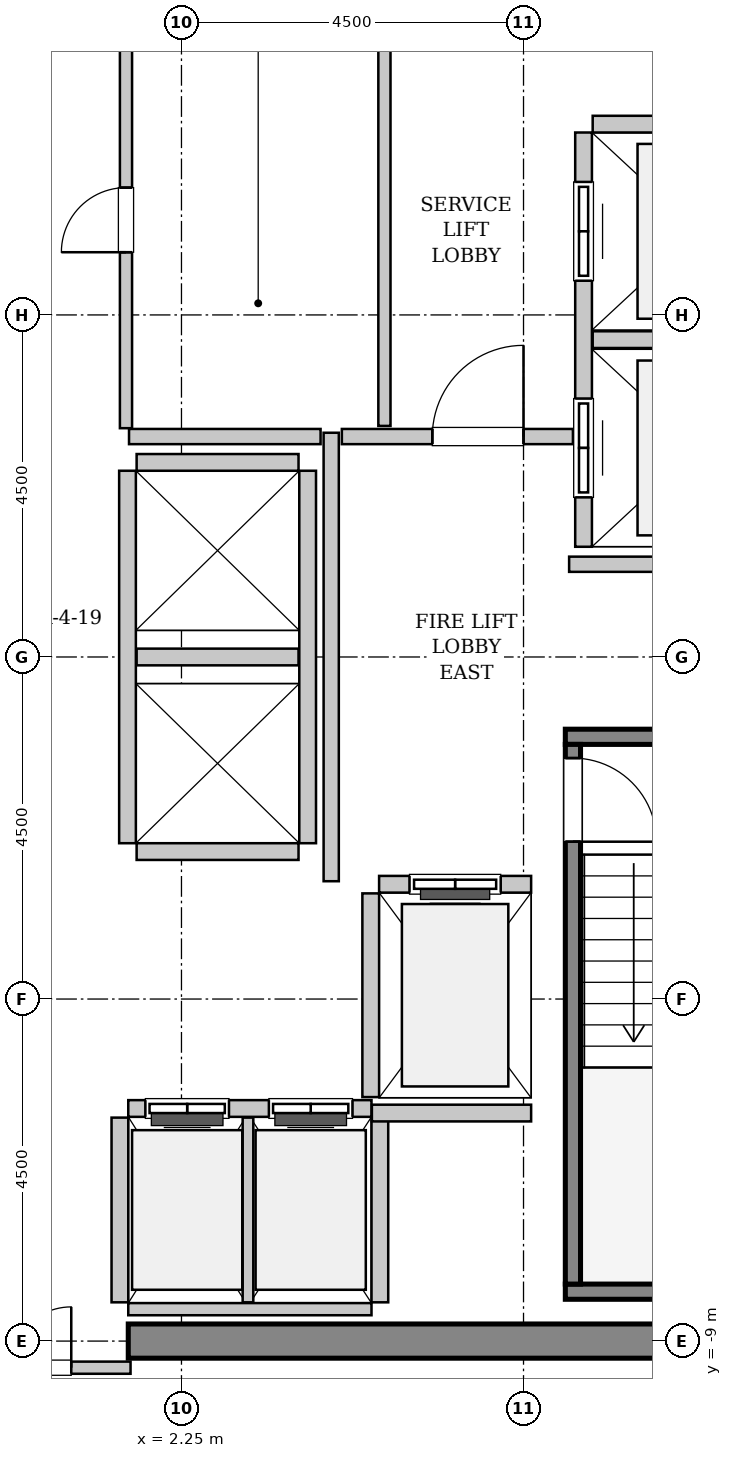
"""IFC4 building model, lengths in metres.
Left out: names, types, materials, properties, quantities, classifications, styles, units other than length and angle.
Written with IfcOpenShell. Run it as: python <this file> out.ifc"""

import sys

from ifc_helpers import new_model, si_unit, direction, frame, frame_2d, origin, place, context, subcontext, project, spatial, rectangle, extrude, source, transform, mapped, element, fill, save


model = new_model("IFC4")
c1 = context("Model", 3, precision=1e-05, world=origin(), true_north=direction((0.0, 1.0)))
c2 = subcontext(c1, "Body", "Model", "MODEL_VIEW")
j1 = project(units=[si_unit("LENGTHUNIT", "METRE"), si_unit("PLANEANGLEUNIT", "RADIAN")], contexts=[c1])
p1 = place(None, origin())
s1 = spatial("IfcSite", under=j1, at=p1, CompositionType="ELEMENT")
p2 = place(p1, origin())
s2 = spatial("IfcBuilding", under=s1, at=p2, CompositionType="ELEMENT")
p3 = place(p2, frame((0.0, 0.0, 214.2)))
s3 = spatial("IfcBuildingStorey", under=s2, at=p3, CompositionType="ELEMENT", Elevation=214.2)
m1 = source(origin(), c2, "Body", "SweptSolid", [
    extrude(rectangle(XDim=9.925, YDim=0.45, at=frame_2d((4.962, 0.0))), origin(), (0.0, 0.0, 1.0), 3.8),
])
p4 = place(p3, frame((1.55, -9.0, 0.0), z_axis=(0.0, 0.0, 1.0), x_axis=(1.0, 0.0, 0.0)))
e1 = element("IfcWall", 1, at=p4, inside=s3, PredefinedType="SHEAR", context=c2, shape_type="MappedRepresentation", body=[
    mapped(m1, transform((0.0, 0.0, 0.0), x_axis=(1.0, 0.0, 0.0), y_axis=(0.0, 1.0, 0.0), z_axis=(0.0, 0.0, 1.0), scale=1.0)),
])
m2 = source(origin(), c2, "Body", "SweptSolid", [
    extrude(rectangle(XDim=3.4, YDim=0.2, at=frame_2d((1.7, 0.0))), origin(), (0.0, 0.0, 1.0), 3.8),
])
p5 = place(p3, frame((7.3, -1.05, 0.0), z_axis=(0.0, 0.0, 1.0), x_axis=(1.0, 0.0, 0.0)))
e2 = element("IfcWall", 2, at=p5, inside=s3, PredefinedType="SOLIDWALL", context=c2, shape_type="MappedRepresentation", body=[
    mapped(m2, transform((0.0, 0.0, 0.0), x_axis=(1.0, 0.0, 0.0), y_axis=(0.0, 1.0, 0.0), z_axis=(0.0, 0.0, 1.0), scale=1.0)),
])
m3 = source(origin(), c2, "Body", "SweptSolid", [
    extrude(rectangle(XDim=3.73, YDim=0.2, at=frame_2d((1.865, 0.0))), origin(), (0.0, 0.0, 1.0), 3.8),
])
p6 = place(p3, frame((7.3, -8.35, 0.0), z_axis=(0.0, 0.0, 1.0), x_axis=(1.0, 0.0, 0.0)))
e3 = element("IfcWall", 3, at=p6, inside=s3, PredefinedType="SOLIDWALL", context=c2, shape_type="MappedRepresentation", body=[
    mapped(m3, transform((0.0, 0.0, 0.0), x_axis=(1.0, 0.0, 0.0), y_axis=(0.0, 1.0, 0.0), z_axis=(0.0, 0.0, 1.0), scale=1.0)),
])
m4 = source(origin(), c2, "Body", "SweptSolid", [
    extrude(rectangle(XDim=7.1, YDim=0.2, at=frame_2d((3.55, 0.0))), origin(), (0.0, 0.0, 1.0), 3.8),
])
p7 = place(p3, frame((7.4, -1.15, 0.0), z_axis=(0.0, 0.0, 1.0), x_axis=(0.0, -1.0, 0.0)))
e4 = element("IfcWall", 4, at=p7, inside=s3, PredefinedType="SOLIDWALL", context=c2, shape_type="MappedRepresentation", body=[
    mapped(m4, transform((0.0, 0.0, 0.0), x_axis=(1.0, 0.0, 0.0), y_axis=(0.0, 1.0, 0.0), z_axis=(0.0, 0.0, 1.0), scale=1.0)),
])
p8 = place(p7, frame((0.18, 0.0, 0.0)))
e5 = element("IfcOpeningElement", 5, at=p8, cuts=e4, PredefinedType="OPENING", context=c2, shape_type="SweptSolid", body=[
    extrude(rectangle(XDim=1.1, YDim=2.15, at=frame_2d((0.55, 1.075))), frame((0.0, 0.11, 0.0), z_axis=(0.0, -1.0, 0.0), x_axis=(1.0, 0.0, 0.0)), (0.0, 0.0, 1.0), 0.22),
])
m5 = source(origin(), c2, "Body", "SweptSolid", [
    extrude(rectangle(XDim=2.0, YDim=0.22, at=frame_2d((1.0, 0.0))), origin(), (0.0, 0.0, 1.0), 3.535),
])
p9 = place(p3, frame((6.85, -2.99, 0.0), z_axis=(0.0, 0.0, 1.0), x_axis=(-1.0, 0.0, 0.0)))
e6 = element("IfcWall", 6, at=p9, inside=s3, PredefinedType="SOLIDWALL", context=c2, shape_type="MappedRepresentation", body=[
    mapped(m5, transform((0.0, 0.0, 0.0), x_axis=(1.0, 0.0, 0.0), y_axis=(0.0, 1.0, 0.0), z_axis=(0.0, 0.0, 1.0), scale=1.0)),
])
p10 = place(p9, frame((0.4, 0.0, 0.0)))
e7 = element("IfcOpeningElement", 7, at=p10, cuts=e6, PredefinedType="OPENING", context=c2, shape_type="SweptSolid", body=[
    extrude(rectangle(XDim=1.2, YDim=2.2, at=frame_2d((0.6, 1.1))), frame((0.0, 0.12, 0.0), z_axis=(0.0, -1.0, 0.0), x_axis=(1.0, 0.0, 0.0)), (0.0, 0.0, 1.0), 0.24),
])
m6 = source(origin(), c2, "Body", "SweptSolid", [
    extrude(rectangle(XDim=2.68, YDim=0.22, at=frame_2d((1.34, 0.0))), origin(), (0.0, 0.0, 1.0), 3.535),
])
p11 = place(p3, frame((4.74, -3.11, 0.0), z_axis=(0.0, 0.0, 1.0), x_axis=(0.0, -1.0, 0.0)))
e8 = element("IfcWall", 8, at=p11, inside=s3, PredefinedType="SOLIDWALL", context=c2, shape_type="MappedRepresentation", body=[
    mapped(m6, transform((0.0, 0.0, 0.0), x_axis=(1.0, 0.0, 0.0), y_axis=(0.0, 1.0, 0.0), z_axis=(0.0, 0.0, 1.0), scale=1.0)),
])
m7 = source(origin(), c2, "Body", "SweptSolid", [
    extrude(rectangle(XDim=5.45, YDim=0.22, at=frame_2d((2.725, 0.0))), origin(), (0.0, 0.0, 1.0), 3.535),
])
p12 = place(p3, frame((7.54, 6.9, 0.0), z_axis=(0.0, 0.0, 1.0), x_axis=(0.0, -1.0, 0.0)))
e9 = element("IfcWall", 9, at=p12, inside=s3, PredefinedType="SOLIDWALL", context=c2, shape_type="MappedRepresentation", body=[
    mapped(m7, transform((0.0, 0.0, 0.0), x_axis=(1.0, 0.0, 0.0), y_axis=(0.0, 1.0, 0.0), z_axis=(0.0, 0.0, 1.0), scale=1.0)),
])
p13 = place(p12, frame((3.5, 0.0, 0.0)))
e10 = element("IfcOpeningElement", 10, at=p13, cuts=e9, PredefinedType="OPENING", context=c2, shape_type="SweptSolid", body=[
    extrude(rectangle(XDim=1.3, YDim=2.3, at=frame_2d((0.65, 1.15))), frame((0.0, 0.12, 0.0), z_axis=(0.0, -1.0, 0.0), x_axis=(1.0, 0.0, 0.0)), (0.0, 0.0, 1.0), 0.24),
])
p14 = place(p12, frame((0.65, 0.0, 0.0)))
e11 = element("IfcOpeningElement", 11, at=p14, cuts=e9, PredefinedType="OPENING", context=c2, shape_type="SweptSolid", body=[
    extrude(rectangle(XDim=1.3, YDim=2.3, at=frame_2d((0.65, 1.15))), frame((0.0, 0.12, 0.0), z_axis=(0.0, -1.0, 0.0), x_axis=(1.0, 0.0, 0.0)), (0.0, 0.0, 1.0), 0.24),
])
m8 = source(origin(), c2, "Body", "SweptSolid", [
    extrude(rectangle(XDim=2.78, YDim=0.22, at=frame_2d((1.39, 0.0))), origin(), (0.0, 0.0, 1.0), 3.535),
])
for number, where, z_axis, x_axis in (
    (12, (7.66, 4.175, 0.0), (0.0, 0.0, 1.0), (1.0, 0.0, 0.0)),
    (13, (10.44, 7.01, 0.0), (0.0, 0.0, 1.0), (-1.0, 0.0, 0.0)),
):
    element("IfcWall", number, at=place(p3, frame(where, z_axis=z_axis, x_axis=x_axis)), inside=s3, PredefinedType="SOLIDWALL", context=c2, shape_type="MappedRepresentation", body=[
        mapped(m8, transform((0.0, 0.0, 0.0), x_axis=(1.0, 0.0, 0.0), y_axis=(0.0, 1.0, 0.0), z_axis=(0.0, 0.0, 1.0), scale=1.0)),
    ])
m9 = source(origin(), c2, "Body", "SweptSolid", [
    extrude(rectangle(XDim=3.2, YDim=0.22, at=frame_2d((1.6, 0.0))), origin(), (0.0, 0.0, 1.0), 3.535),
])
p15 = place(p3, frame((4.75, -5.94, 0.0), z_axis=(0.0, 0.0, 1.0), x_axis=(-1.0, 0.0, 0.0)))
e14 = element("IfcWall", 14, at=p15, inside=s3, PredefinedType="SOLIDWALL", context=c2, shape_type="MappedRepresentation", body=[
    mapped(m9, transform((0.0, 0.0, 0.0), x_axis=(1.0, 0.0, 0.0), y_axis=(0.0, 1.0, 0.0), z_axis=(0.0, 0.0, 1.0), scale=1.0)),
])
p16 = place(p15, frame((1.875, 0.0, 0.0)))
e15 = element("IfcOpeningElement", 15, at=p16, cuts=e14, PredefinedType="OPENING", context=c2, shape_type="SweptSolid", body=[
    extrude(rectangle(XDim=1.1, YDim=2.2, at=frame_2d((0.55, 1.1))), frame((0.0, 0.12, 0.0), z_axis=(0.0, -1.0, 0.0), x_axis=(1.0, 0.0, 0.0)), (0.0, 0.0, 1.0), 0.24),
])
p17 = place(p15, frame((0.25, 0.0, 0.0)))
e16 = element("IfcOpeningElement", 16, at=p17, cuts=e14, PredefinedType="OPENING", context=c2, shape_type="SweptSolid", body=[
    extrude(rectangle(XDim=1.1, YDim=2.2, at=frame_2d((0.55, 1.1))), frame((0.0, 0.12, 0.0), z_axis=(0.0, -1.0, 0.0), x_axis=(1.0, 0.0, 0.0)), (0.0, 0.0, 1.0), 0.24),
])
m10 = source(origin(), c2, "Body", "SweptSolid", [
    extrude(rectangle(XDim=3.2, YDim=0.16, at=frame_2d((1.6, 0.0))), origin(), (0.0, 0.0, 1.0), 2.625),
])
p18 = place(p3, frame((1.55, -8.58, 0.0), z_axis=(0.0, 0.0, 1.0), x_axis=(1.0, 0.0, 0.0)))
e17 = element("IfcWall", 17, at=p18, inside=s3, PredefinedType="PARTITIONING", context=c2, shape_type="MappedRepresentation", body=[
    mapped(m10, transform((0.0, 0.0, 0.0), x_axis=(1.0, 0.0, 0.0), y_axis=(0.0, 1.0, 0.0), z_axis=(0.0, 0.0, 1.0), scale=1.0)),
])
m11 = source(origin(), c2, "Body", "SweptSolid", [
    extrude(rectangle(XDim=2.43, YDim=0.22, at=frame_2d((1.215, 0.0))), origin(), (0.0, 0.0, 1.0), 3.535),
])
p19 = place(p3, frame((1.44, -6.06, 0.0), z_axis=(0.0, 0.0, 1.0), x_axis=(0.0, -1.0, 0.0)))
e18 = element("IfcWall", 18, at=p19, inside=s3, PredefinedType="SOLIDWALL", context=c2, shape_type="MappedRepresentation", body=[
    mapped(m11, transform((0.0, 0.0, 0.0), x_axis=(1.0, 0.0, 0.0), y_axis=(0.0, 1.0, 0.0), z_axis=(0.0, 0.0, 1.0), scale=1.0)),
])
m12 = source(origin(), c2, "Body", "SweptSolid", [
    extrude(rectangle(XDim=2.43, YDim=0.14, at=frame_2d((1.215, 0.0))), origin(), (0.0, 0.0, 1.0), 3.535),
])
p20 = place(p3, frame((3.125, -8.49, 0.0), z_axis=(0.0, 0.0, 1.0), x_axis=(0.0, 1.0, 0.0)))
e19 = element("IfcWall", 19, at=p20, inside=s3, PredefinedType="PARTITIONING", context=c2, shape_type="MappedRepresentation", body=[
    mapped(m12, transform((0.0, 0.0, 0.0), x_axis=(1.0, 0.0, 0.0), y_axis=(0.0, 1.0, 0.0), z_axis=(0.0, 0.0, 1.0), scale=1.0)),
])
p21 = place(p3, frame((4.86, -8.49, 0.0), z_axis=(0.0, 0.0, 1.0), x_axis=(0.0, 1.0, 0.0)))
e20 = element("IfcWall", 20, at=p21, inside=s3, PredefinedType="SOLIDWALL", context=c2, shape_type="MappedRepresentation", body=[
    mapped(m11, transform((0.0, 0.0, 0.0), x_axis=(1.0, 0.0, 0.0), y_axis=(0.0, 1.0, 0.0), z_axis=(0.0, 0.0, 1.0), scale=1.0)),
])
m13 = source(origin(), c2, "Body", "SweptSolid", [
    extrude(rectangle(XDim=4.9, YDim=0.22, at=frame_2d((2.45, 0.0))), origin(), (0.0, 0.0, 1.0), 3.535),
])
for number, where, z_axis, x_axis in (
    (21, (1.54, 2.45, 0.0), (0.0, 0.0, 1.0), (0.0, -1.0, 0.0)),
    (22, (3.91, -2.45, 0.0), (0.0, 0.0, 1.0), (0.0, 1.0, 0.0)),
):
    element("IfcWall", number, at=place(p3, frame(where, z_axis=z_axis, x_axis=x_axis)), inside=s3, PredefinedType="SOLIDWALL", context=c2, shape_type="MappedRepresentation", body=[
        mapped(m13, transform((0.0, 0.0, 0.0), x_axis=(1.0, 0.0, 0.0), y_axis=(0.0, 1.0, 0.0), z_axis=(0.0, 0.0, 1.0), scale=1.0)),
    ])
m14 = source(origin(), c2, "Body", "SweptSolid", [
    extrude(rectangle(XDim=2.13, YDim=0.22, at=frame_2d((1.065, 0.0))), origin(), (0.0, 0.0, 1.0), 3.535),
])
for number, where, z_axis, x_axis in (
    (23, (1.66, -2.56, 0.0), (0.0, 0.0, 1.0), (1.0, 0.0, 0.0)),
    (24, (1.66, 0.0, 0.0), (0.0, 0.0, 1.0), (1.0, 0.0, 0.0)),
    (25, (3.79, 2.56, 0.0), (0.0, 0.0, 1.0), (-1.0, 0.0, 0.0)),
):
    element("IfcWall", number, at=place(p3, frame(where, z_axis=z_axis, x_axis=x_axis)), inside=s3, PredefinedType="SOLIDWALL", context=c2, shape_type="MappedRepresentation", body=[
        mapped(m14, transform((0.0, 0.0, 0.0), x_axis=(1.0, 0.0, 0.0), y_axis=(0.0, 1.0, 0.0), z_axis=(0.0, 0.0, 1.0), scale=1.0)),
    ])
m15 = source(origin(), c2, "Body", "SweptSolid", [
    extrude(rectangle(XDim=2.095, YDim=0.22, at=frame_2d((1.048, 0.0))), origin(), (0.0, 0.0, 1.0), 3.535),
])
p22 = place(p3, frame((4.755, -6.0, 0.0), z_axis=(0.0, 0.0, 1.0), x_axis=(1.0, 0.0, 0.0)))
e26 = element("IfcWall", 26, at=p22, inside=s3, PredefinedType="SOLIDWALL", context=c2, shape_type="MappedRepresentation", body=[
    mapped(m15, transform((0.0, 0.0, 0.0), x_axis=(1.0, 0.0, 0.0), y_axis=(0.0, 1.0, 0.0), z_axis=(0.0, 0.0, 1.0), scale=1.0)),
])
m16 = source(origin(), c2, "Body", "SweptSolid", [
    extrude(rectangle(XDim=5.9, YDim=0.2, at=frame_2d((2.95, 0.0))), origin(), (0.0, 0.0, 1.0), 3.535),
])
p23 = place(p3, frame((4.22, -2.95, 0.0), z_axis=(0.0, 0.0, 1.0), x_axis=(0.0, 1.0, 0.0)))
e27 = element("IfcWall", 27, at=p23, inside=s3, PredefinedType="PARTITIONING", context=c2, shape_type="MappedRepresentation", body=[
    mapped(m16, transform((0.0, 0.0, 0.0), x_axis=(1.0, 0.0, 0.0), y_axis=(0.0, 1.0, 0.0), z_axis=(0.0, 0.0, 1.0), scale=1.0)),
])
m17 = source(origin(), c2, "Body", "SweptSolid", [
    extrude(rectangle(XDim=2.52, YDim=0.2, at=frame_2d((1.26, 0.0))), origin(), (0.0, 0.0, 1.0), 3.535),
])
p24 = place(p3, frame((1.56, 2.9, 0.0), z_axis=(0.0, 0.0, 1.0), x_axis=(1.0, 0.0, 0.0)))
e28 = element("IfcWall", 28, at=p24, inside=s3, PredefinedType="PARTITIONING", context=c2, shape_type="MappedRepresentation", body=[
    mapped(m17, transform((0.0, 0.0, 0.0), x_axis=(1.0, 0.0, 0.0), y_axis=(0.0, 1.0, 0.0), z_axis=(0.0, 0.0, 1.0), scale=1.0)),
])
m18 = source(origin(), c2, "Body", "SweptSolid", [
    extrude(rectangle(XDim=3.04, YDim=0.2, at=frame_2d((1.52, 0.0))), origin(), (0.0, 0.0, 1.0), 3.535),
])
p25 = place(p3, frame((4.36, 2.9, 0.0), z_axis=(0.0, 0.0, 1.0), x_axis=(1.0, 0.0, 0.0)))
e29 = element("IfcWall", 29, at=p25, inside=s3, PredefinedType="PARTITIONING", context=c2, shape_type="MappedRepresentation", body=[
    mapped(m18, transform((0.0, 0.0, 0.0), x_axis=(1.0, 0.0, 0.0), y_axis=(0.0, 1.0, 0.0), z_axis=(0.0, 0.0, 1.0), scale=1.0)),
])
p26 = place(p25, frame((1.19, 0.0, 0.0)))
e30 = element("IfcOpeningElement", 30, at=p26, cuts=e29, PredefinedType="OPENING", context=c2, shape_type="SweptSolid", body=[
    extrude(rectangle(XDim=1.2, YDim=2.15, at=frame_2d((0.6, 1.075))), frame((0.0, 0.11, 0.0), z_axis=(0.0, -1.0, 0.0), x_axis=(1.0, 0.0, 0.0)), (0.0, 0.0, 1.0), 0.22),
])
m19 = source(origin(), c2, "Body", "SweptSolid", [
    extrude(rectangle(XDim=4.11, YDim=0.2, at=frame_2d((2.055, 0.0))), origin(), (0.0, 0.0, 1.0), 3.535),
])
p27 = place(p3, frame((7.35, 1.22, 0.0), z_axis=(0.0, 0.0, 1.0), x_axis=(1.0, 0.0, 0.0)))
e31 = element("IfcWall", 31, at=p27, inside=s3, PredefinedType="PARTITIONING", context=c2, shape_type="MappedRepresentation", body=[
    mapped(m19, transform((0.0, 0.0, 0.0), x_axis=(1.0, 0.0, 0.0), y_axis=(0.0, 1.0, 0.0), z_axis=(0.0, 0.0, 1.0), scale=1.0)),
])
m20 = source(origin(), c2, "Body", "SweptSolid", [
    extrude(rectangle(XDim=3.16, YDim=0.16, at=frame_2d((1.58, 0.0))), origin(), (0.0, 0.0, 1.0), 2.625),
])
p28 = place(p3, frame((-1.58, -9.35, 0.0), z_axis=(0.0, 0.0, 1.0), x_axis=(1.0, 0.0, 0.0)))
e32 = element("IfcWall", 32, at=p28, inside=s3, PredefinedType="PARTITIONING", context=c2, shape_type="MappedRepresentation", body=[
    mapped(m20, transform((0.0, 0.0, 0.0), x_axis=(1.0, 0.0, 0.0), y_axis=(0.0, 1.0, 0.0), z_axis=(0.0, 0.0, 1.0), scale=1.0)),
])
p29 = place(p28, frame((0.78, 0.0, 0.0)))
e33 = element("IfcOpeningElement", 33, at=p29, cuts=e32, PredefinedType="OPENING", context=c2, shape_type="SweptSolid", body=[
    extrude(rectangle(XDim=1.6, YDim=2.3, at=frame_2d((0.8, 1.15))), frame((0.0, 0.09, 0.0), z_axis=(0.0, -1.0, 0.0), x_axis=(1.0, 0.0, 0.0)), (0.0, 0.0, 1.0), 0.18),
])
m21 = source(origin(), c2, "Body", "SweptSolid", [
    extrude(rectangle(XDim=5.45, YDim=0.16, at=frame_2d((2.725, 0.0))), origin(), (0.0, 0.0, 1.0), 3.535),
])
p30 = place(p3, frame((4.92, 3.04, 0.0), z_axis=(0.0, 0.0, 1.0), x_axis=(0.0, 1.0, 0.0)))
e34 = element("IfcWall", 34, at=p30, inside=s3, PredefinedType="PARTITIONING", context=c2, shape_type="MappedRepresentation", body=[
    mapped(m21, transform((0.0, 0.0, 0.0), x_axis=(1.0, 0.0, 0.0), y_axis=(0.0, 1.0, 0.0), z_axis=(0.0, 0.0, 1.0), scale=1.0)),
])
m22 = source(origin(), c2, "Body", "SweptSolid", [
    extrude(rectangle(XDim=5.48, YDim=0.16, at=frame_2d((2.74, 0.0))), origin(), (0.0, 0.0, 1.0), 3.535),
])
p31 = place(p3, frame((1.52, 3.01, 0.0), z_axis=(0.0, 0.0, 1.0), x_axis=(0.0, 1.0, 0.0)))
e35 = element("IfcWall", 35, at=p31, inside=s3, PredefinedType="PARTITIONING", context=c2, shape_type="MappedRepresentation", body=[
    mapped(m22, transform((0.0, 0.0, 0.0), x_axis=(1.0, 0.0, 0.0), y_axis=(0.0, 1.0, 0.0), z_axis=(0.0, 0.0, 1.0), scale=1.0)),
])
p32 = place(p31, frame((2.315, 0.0, 0.0)))
e36 = element("IfcOpeningElement", 36, at=p32, cuts=e35, PredefinedType="OPENING", context=c2, shape_type="SweptSolid", body=[
    extrude(rectangle(XDim=0.85, YDim=2.1, at=frame_2d((0.425, 1.05))), frame((0.0, 0.09, 0.0), z_axis=(0.0, -1.0, 0.0), x_axis=(1.0, 0.0, 0.0)), (0.0, 0.0, 1.0), 0.18),
])
m23 = source(origin(), c2, "Body", "SweptSolid", [
    extrude(rectangle(XDim=1.1, YDim=2.15, at=frame_2d((0.55, 1.075))), frame((0.0, 0.025, 0.0), z_axis=(0.0, -1.0, 0.0), x_axis=(1.0, 0.0, 0.0)), (0.0, 0.0, 1.0), 0.05),
])
p33 = place(p8, origin())
e37 = element("IfcDoor", 37, at=p33, inside=s3, OperationType="SINGLE_SWING_RIGHT", PredefinedType="DOOR", context=c2, shape_type="MappedRepresentation", body=[
    mapped(m23, transform((0.0, 0.0, 0.0), x_axis=(1.0, 0.0, 0.0), y_axis=(0.0, 1.0, 0.0), z_axis=(0.0, 0.0, 1.0), scale=1.0)),
])
fill(e5, e37)
m24 = source(origin(), c2, "Body", "SweptSolid", [
    extrude(rectangle(XDim=1.2, YDim=2.2, at=frame_2d((0.6, 1.1))), frame((0.0, 0.025, 0.0), z_axis=(0.0, -1.0, 0.0), x_axis=(1.0, 0.0, 0.0)), (0.0, 0.0, 1.0), 0.05),
])
p34 = place(p10, origin())
e38 = element("IfcDoor", 38, at=p34, inside=s3, OperationType="SLIDING_TO_LEFT", PredefinedType="DOOR", context=c2, shape_type="MappedRepresentation", body=[
    mapped(m24, transform((0.0, 0.0, 0.0), x_axis=(1.0, 0.0, 0.0), y_axis=(0.0, 1.0, 0.0), z_axis=(0.0, 0.0, 1.0), scale=1.0)),
])
fill(e7, e38)
m25 = source(origin(), c2, "Body", "SweptSolid", [
    extrude(rectangle(XDim=1.3, YDim=2.3, at=frame_2d((0.65, 1.15))), frame((0.0, 0.025, 0.0), z_axis=(0.0, -1.0, 0.0), x_axis=(1.0, 0.0, 0.0)), (0.0, 0.0, 1.0), 0.05),
])
p35 = place(p13, origin())
e39 = element("IfcDoor", 39, at=p35, inside=s3, OperationType="SLIDING_TO_RIGHT", PredefinedType="DOOR", context=c2, shape_type="MappedRepresentation", body=[
    mapped(m25, transform((0.0, 0.0, 0.0), x_axis=(1.0, 0.0, 0.0), y_axis=(0.0, 1.0, 0.0), z_axis=(0.0, 0.0, 1.0), scale=1.0)),
])
fill(e10, e39)
p36 = place(p14, origin())
e40 = element("IfcDoor", 40, at=p36, inside=s3, OperationType="SLIDING_TO_RIGHT", PredefinedType="DOOR", context=c2, shape_type="MappedRepresentation", body=[
    mapped(m25, transform((0.0, 0.0, 0.0), x_axis=(1.0, 0.0, 0.0), y_axis=(0.0, 1.0, 0.0), z_axis=(0.0, 0.0, 1.0), scale=1.0)),
])
fill(e11, e40)
m26 = source(origin(), c2, "Body", "SweptSolid", [
    extrude(rectangle(XDim=1.1, YDim=2.2, at=frame_2d((0.55, 1.1))), frame((0.0, 0.025, 0.0), z_axis=(0.0, -1.0, 0.0), x_axis=(1.0, 0.0, 0.0)), (0.0, 0.0, 1.0), 0.05),
])
p37 = place(p16, origin())
e41 = element("IfcDoor", 41, at=p37, inside=s3, OperationType="DOUBLE_DOOR_SLIDING", PredefinedType="DOOR", context=c2, shape_type="MappedRepresentation", body=[
    mapped(m26, transform((0.0, 0.0, 0.0), x_axis=(1.0, 0.0, 0.0), y_axis=(0.0, 1.0, 0.0), z_axis=(0.0, 0.0, 1.0), scale=1.0)),
])
fill(e15, e41)
p38 = place(p17, origin())
e42 = element("IfcDoor", 42, at=p38, inside=s3, OperationType="DOUBLE_DOOR_SLIDING", PredefinedType="DOOR", context=c2, shape_type="MappedRepresentation", body=[
    mapped(m26, transform((0.0, 0.0, 0.0), x_axis=(1.0, 0.0, 0.0), y_axis=(0.0, 1.0, 0.0), z_axis=(0.0, 0.0, 1.0), scale=1.0)),
])
fill(e16, e42)
m27 = source(origin(), c2, "Body", "SweptSolid", [
    extrude(rectangle(XDim=1.2, YDim=2.15, at=frame_2d((0.6, 1.075))), frame((0.0, 0.025, 0.0), z_axis=(0.0, -1.0, 0.0), x_axis=(1.0, 0.0, 0.0)), (0.0, 0.0, 1.0), 0.05),
])
p39 = place(p26, origin())
e43 = element("IfcDoor", 43, at=p39, inside=s3, OperationType="SINGLE_SWING_RIGHT", PredefinedType="DOOR", context=c2, shape_type="MappedRepresentation", body=[
    mapped(m27, transform((0.0, 0.0, 0.0), x_axis=(1.0, 0.0, 0.0), y_axis=(0.0, 1.0, 0.0), z_axis=(0.0, 0.0, 1.0), scale=1.0)),
])
fill(e30, e43)
m28 = source(origin(), c2, "Body", "SweptSolid", [
    extrude(rectangle(XDim=1.6, YDim=2.3, at=frame_2d((0.8, 1.15))), frame((0.0, 0.025, 0.0), z_axis=(0.0, -1.0, 0.0), x_axis=(1.0, 0.0, 0.0)), (0.0, 0.0, 1.0), 0.05),
])
p40 = place(p29, origin())
e44 = element("IfcDoor", 44, at=p40, inside=s3, OperationType="DOUBLE_DOOR_SINGLE_SWING", PredefinedType="DOOR", context=c2, shape_type="MappedRepresentation", body=[
    mapped(m28, transform((0.0, 0.0, 0.0), x_axis=(1.0, 0.0, 0.0), y_axis=(0.0, 1.0, 0.0), z_axis=(0.0, 0.0, 1.0), scale=1.0)),
])
fill(e33, e44)
m29 = source(origin(), c2, "Body", "SweptSolid", [
    extrude(rectangle(XDim=0.85, YDim=2.1, at=frame_2d((0.425, 1.05))), frame((0.0, 0.025, 0.0), z_axis=(0.0, -1.0, 0.0), x_axis=(1.0, 0.0, 0.0)), (0.0, 0.0, 1.0), 0.05),
])
p41 = place(p32, origin())
e45 = element("IfcDoor", 45, at=p41, inside=s3, OperationType="SINGLE_SWING_LEFT", PredefinedType="DOOR", context=c2, shape_type="MappedRepresentation", body=[
    mapped(m29, transform((0.0, 0.0, 0.0), x_axis=(1.0, 0.0, 0.0), y_axis=(0.0, 1.0, 0.0), z_axis=(0.0, 0.0, 1.0), scale=1.0)),
])
fill(e36, e45)
save(model, sys.argv[1])
